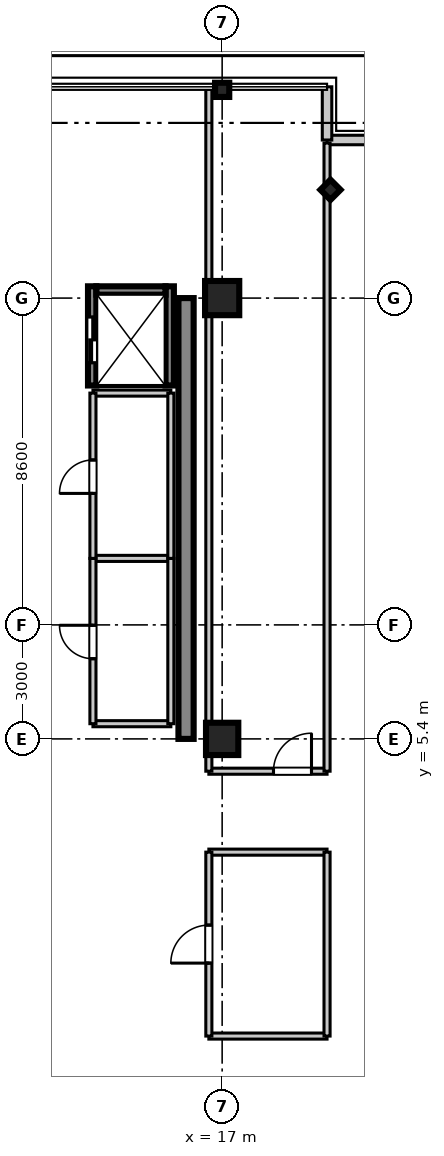
"""IFC4 building model, lengths in metres.
Left out: names, types, materials, properties, quantities, classifications, styles, units other than length and angle.
Written with IfcOpenShell. Run it as: python <this file> out.ifc"""

import sys

from ifc_helpers import new_model, si_unit, direction, frame, frame_2d, origin, origin_2d, place, context, subcontext, project, spatial, rectangle, i_section, extrude, source, transform, mapped, element, fill, save


model = new_model("IFC4")
c1 = context("Model", 3, precision=1e-05, world=origin(), true_north=direction((0.0, 1.0)))
c2 = subcontext(c1, "Body", "Model", "MODEL_VIEW")
j1 = project(units=[si_unit("LENGTHUNIT", "METRE"), si_unit("PLANEANGLEUNIT", "RADIAN")], contexts=[c1])
p1 = place(None, origin())
s1 = spatial("IfcSite", under=j1, at=p1, CompositionType="ELEMENT")
p2 = place(p1, origin())
s2 = spatial("IfcBuilding", under=s1, at=p2, CompositionType="ELEMENT")
p3 = place(p2, frame((0.0, 0.0, 266.3)))
s3 = spatial("IfcBuildingStorey", under=s2, at=p3, CompositionType="ELEMENT", Elevation=266.3)
m1 = source(origin(), c2, "Body", "SweptSolid", [
    extrude(rectangle(XDim=0.85, YDim=0.85, at=origin_2d()), origin(), (0.0, 0.0, 1.0), 3.705),
])
p4 = place(p3, frame((17.0, 5.4, 0.0), z_axis=(0.0, 0.0, 1.0), x_axis=(1.0, 0.0, 0.0)))
e1 = element("IfcColumn", 1, at=p4, inside=s3, PredefinedType="PILASTER", context=c2, shape_type="MappedRepresentation", body=[
    mapped(m1, transform((0.0, 0.0, 0.0), scale=1.0)),
])
m2 = source(origin(), c2, "Body", "SweptSolid", [
    extrude(rectangle(XDim=0.9, YDim=0.9, at=origin_2d()), origin(), (0.0, 0.0, 1.0), 3.705),
])
p5 = place(p3, frame((17.0, 17.0, 0.0), z_axis=(0.0, 0.0, 1.0), x_axis=(1.0, 0.0, 0.0)))
e2 = element("IfcColumn", 2, at=p5, inside=s3, PredefinedType="COLUMN", context=c2, shape_type="MappedRepresentation", body=[
    mapped(m2, transform((0.0, 0.0, 0.0), scale=1.0)),
])
m3 = source(origin(), c2, "Body", "SweptSolid", [
    extrude(i_section(OverallWidth=0.374, OverallDepth=0.374, WebThickness=0.014, FlangeThickness=0.023, at=origin_2d()), origin(), (0.0, 0.0, 1.0), 3.705),
])
for number, where, z_axis, x_axis in (
    (3, (17.0, 22.48, 0.0), (0.0, 0.0, 1.0), (0.0, 1.0, 0.0)),
    (4, (19.85, 19.85, 0.0), (0.0, 0.0, 1.0), (0.707, 0.707, 0.0)),
):
    element("IfcColumn", number, at=place(p3, frame(where, z_axis=z_axis, x_axis=x_axis)), inside=s3, PredefinedType="COLUMN", context=c2, shape_type="MappedRepresentation", body=[
        mapped(m3, transform((0.0, 0.0, 0.0), scale=1.0)),
    ])
m4 = source(origin(), c2, "Body", "SweptSolid", [
    extrude(rectangle(XDim=11.6, YDim=0.4, at=frame_2d((5.8, 0.0))), origin(), (0.0, 0.0, 1.0), 3.45),
])
p6 = place(p3, frame((16.05, 5.4, 0.0), z_axis=(0.0, 0.0, 1.0), x_axis=(0.0, 1.0, 0.0)))
e5 = element("IfcWall", 5, at=p6, inside=s3, PredefinedType="SHEAR", context=c2, shape_type="MappedRepresentation", body=[
    mapped(m4, transform((0.0, 0.0, 0.0), scale=1.0)),
])
m5 = source(origin(), c2, "Body", "SweptSolid", [
    extrude(rectangle(XDim=2.61, YDim=0.22, at=frame_2d((1.305, 0.0))), origin(), (0.0, 0.0, 1.0), 3.45),
])
p7 = place(p3, frame((13.58, 14.7, 0.0), z_axis=(0.0, 0.0, 1.0), x_axis=(0.0, 1.0, 0.0)))
e6 = element("IfcWall", 6, at=p7, inside=s3, PredefinedType="SHEAR", context=c2, shape_type="MappedRepresentation", body=[
    mapped(m5, transform((0.0, 0.0, 0.0), scale=1.0)),
])
p8 = place(p7, frame((0.6, 0.0, 0.0)))
e7 = element("IfcOpeningElement", 7, at=p8, cuts=e6, PredefinedType="OPENING", context=c2, shape_type="SweptSolid", body=[
    extrude(rectangle(XDim=1.2, YDim=2.2, at=frame_2d((0.6, 1.1))), frame((0.0, 0.12, 0.0), z_axis=(0.0, -1.0, 0.0), x_axis=(1.0, 0.0, 0.0)), (0.0, 0.0, 1.0), 0.24),
])
p9 = place(p3, frame((15.62, 14.7, 0.0), z_axis=(0.0, 0.0, 1.0), x_axis=(0.0, 1.0, 0.0)))
e8 = element("IfcWall", 8, at=p9, inside=s3, PredefinedType="SHEAR", context=c2, shape_type="MappedRepresentation", body=[
    mapped(m5, transform((0.0, 0.0, 0.0), scale=1.0)),
])
m6 = source(origin(), c2, "Body", "SweptSolid", [
    extrude(rectangle(XDim=1.82, YDim=0.22, at=frame_2d((0.91, 0.0))), origin(), (0.0, 0.0, 1.0), 3.45),
])
p10 = place(p3, frame((13.69, 17.2, 0.0), z_axis=(0.0, 0.0, 1.0), x_axis=(1.0, 0.0, 0.0)))
e9 = element("IfcWall", 9, at=p10, inside=s3, PredefinedType="SHEAR", context=c2, shape_type="MappedRepresentation", body=[
    mapped(m6, transform((0.0, 0.0, 0.0), scale=1.0)),
])
m7 = source(origin(), c2, "Body", "SweptSolid", [
    extrude(rectangle(XDim=1.4, YDim=0.25, at=frame_2d((0.7, 0.0))), origin(), (0.0, 0.0, 1.0), 3.45),
])
p11 = place(p3, frame((19.76, 21.16, 0.0), z_axis=(0.0, 0.0, 1.0), x_axis=(1.0, 0.0, 0.0)))
e10 = element("IfcWall", 10, at=p11, inside=s3, PredefinedType="STANDARD", context=c2, shape_type="MappedRepresentation", body=[
    mapped(m7, transform((0.0, 0.0, 0.0), scale=1.0)),
])
m8 = source(origin(), c2, "Body", "SweptSolid", [
    extrude(rectangle(XDim=1.4, YDim=0.25, at=frame_2d((0.7, 0.0))), origin(), (0.0, 0.0, 1.0), 3.45),
])
p12 = place(p3, frame((19.76, 21.16, 0.0), z_axis=(0.0, 0.0, 1.0), x_axis=(0.0, 1.0, 0.0)))
e11 = element("IfcWall", 11, at=p12, inside=s3, PredefinedType="STANDARD", context=c2, shape_type="MappedRepresentation", body=[
    mapped(m8, transform((0.0, 0.0, 0.0), scale=1.0)),
])
m9 = source(origin(), c2, "Body", "SweptSolid", [
    extrude(rectangle(XDim=2.05, YDim=0.16, at=frame_2d((1.025, 0.0))), origin(), (0.0, 0.0, 1.0), 2.79),
])
for number, where, z_axis, x_axis in (
    (12, (13.6, 5.8, 0.0), (0.0, 0.0, 1.0), (1.0, 0.0, 0.0)),
    (13, (13.6, 10.15, 0.0), (0.0, 0.0, 1.0), (1.0, 0.0, 0.0)),
):
    element("IfcWall", number, at=place(p3, frame(where, z_axis=z_axis, x_axis=x_axis)), inside=s3, PredefinedType="PARTITIONING", context=c2, shape_type="MappedRepresentation", body=[
        mapped(m9, transform((0.0, 0.0, 0.0), scale=1.0)),
    ])
m10 = source(origin(), c2, "Body", "SweptSolid", [
    extrude(rectangle(XDim=4.35, YDim=0.16, at=frame_2d((2.175, 0.0))), origin(), (0.0, 0.0, 1.0), 2.79),
])
p13 = place(p3, frame((13.6, 5.8, 0.0), z_axis=(0.0, 0.0, 1.0), x_axis=(0.0, 1.0, 0.0)))
e14 = element("IfcWall", 14, at=p13, inside=s3, PredefinedType="PARTITIONING", context=c2, shape_type="MappedRepresentation", body=[
    mapped(m10, transform((0.0, 0.0, 0.0), scale=1.0)),
])
p14 = place(p13, frame((1.71, 0.0, 0.0)))
e15 = element("IfcOpeningElement", 15, at=p14, cuts=e14, PredefinedType="OPENING", context=c2, shape_type="SweptSolid", body=[
    extrude(rectangle(XDim=0.88, YDim=2.1, at=frame_2d((0.44, 1.05))), frame((0.0, 0.09, 0.0), z_axis=(0.0, -1.0, 0.0), x_axis=(1.0, 0.0, 0.0)), (0.0, 0.0, 1.0), 0.18),
])
p15 = place(p3, frame((15.65, 5.8, 0.0), z_axis=(0.0, 0.0, 1.0), x_axis=(0.0, 1.0, 0.0)))
e16 = element("IfcWall", 16, at=p15, inside=s3, PredefinedType="PARTITIONING", context=c2, shape_type="MappedRepresentation", body=[
    mapped(m10, transform((0.0, 0.0, 0.0), scale=1.0)),
])
p16 = place(p3, frame((13.6, 14.5, 0.0), z_axis=(0.0, 0.0, 1.0), x_axis=(1.0, 0.0, 0.0)))
e17 = element("IfcWall", 17, at=p16, inside=s3, PredefinedType="PARTITIONING", context=c2, shape_type="MappedRepresentation", body=[
    mapped(m9, transform((0.0, 0.0, 0.0), scale=1.0)),
])
m11 = source(origin(), c2, "Body", "SweptSolid", [
    extrude(rectangle(XDim=4.35, YDim=0.16, at=frame_2d((2.175, 0.0))), origin(), (0.0, 0.0, 1.0), 2.79),
])
p17 = place(p3, frame((13.6, 10.15, 0.0), z_axis=(0.0, 0.0, 1.0), x_axis=(0.0, 1.0, 0.0)))
e18 = element("IfcWall", 18, at=p17, inside=s3, PredefinedType="PARTITIONING", context=c2, shape_type="MappedRepresentation", body=[
    mapped(m11, transform((0.0, 0.0, 0.0), scale=1.0)),
])
p18 = place(p17, frame((1.71, 0.0, 0.0)))
e19 = element("IfcOpeningElement", 19, at=p18, cuts=e18, PredefinedType="OPENING", context=c2, shape_type="SweptSolid", body=[
    extrude(rectangle(XDim=0.88, YDim=2.1, at=frame_2d((0.44, 1.05))), frame((0.0, 0.09, 0.0), z_axis=(0.0, -1.0, 0.0), x_axis=(1.0, 0.0, 0.0)), (0.0, 0.0, 1.0), 0.18),
])
p19 = place(p3, frame((15.65, 10.15, 0.0), z_axis=(0.0, 0.0, 1.0), x_axis=(0.0, 1.0, 0.0)))
e20 = element("IfcWall", 20, at=p19, inside=s3, PredefinedType="PARTITIONING", context=c2, shape_type="MappedRepresentation", body=[
    mapped(m11, transform((0.0, 0.0, 0.0), scale=1.0)),
])
m12 = source(origin(), c2, "Body", "SweptSolid", [
    extrude(rectangle(XDim=3.11, YDim=0.16, at=frame_2d((1.555, 0.0))), origin(), (0.0, 0.0, 1.0), 2.79),
])
p20 = place(p3, frame((16.65, 4.55, 0.0), z_axis=(0.0, 0.0, 1.0), x_axis=(1.0, 0.0, 0.0)))
e21 = element("IfcWall", 21, at=p20, inside=s3, PredefinedType="PARTITIONING", context=c2, shape_type="MappedRepresentation", body=[
    mapped(m12, transform((0.0, 0.0, 0.0), scale=1.0)),
])
p21 = place(p20, frame((1.701, 0.0, 0.0)))
e22 = element("IfcOpeningElement", 22, at=p21, cuts=e21, PredefinedType="OPENING", context=c2, shape_type="SweptSolid", body=[
    extrude(rectangle(XDim=1.0, YDim=2.1, at=frame_2d((0.5, 1.05))), frame((0.0, 0.09, 0.0), z_axis=(0.0, -1.0, 0.0), x_axis=(1.0, 0.0, 0.0)), (0.0, 0.0, 1.0), 0.18),
])
m13 = source(origin(), c2, "Body", "SweptSolid", [
    extrude(rectangle(XDim=17.95, YDim=0.16, at=frame_2d((8.975, 0.0))), origin(), (0.0, 0.0, 1.0), 2.79),
])
p22 = place(p3, frame((16.65, 4.55, 0.0), z_axis=(0.0, 0.0, 1.0), x_axis=(0.0, 1.0, 0.0)))
e23 = element("IfcWall", 23, at=p22, inside=s3, PredefinedType="PARTITIONING", context=c2, shape_type="MappedRepresentation", body=[
    mapped(m13, transform((0.0, 0.0, 0.0), scale=1.0)),
])
m14 = source(origin(), c2, "Body", "SweptSolid", [
    extrude(rectangle(XDim=16.53, YDim=0.16, at=frame_2d((8.265, 0.0))), origin(), (0.0, 0.0, 1.0), 2.79),
])
p23 = place(p3, frame((19.76, 4.55, 0.0), z_axis=(0.0, 0.0, 1.0), x_axis=(0.0, 1.0, 0.0)))
e24 = element("IfcWall", 24, at=p23, inside=s3, PredefinedType="PARTITIONING", context=c2, shape_type="MappedRepresentation", body=[
    mapped(m14, transform((0.0, 0.0, 0.0), scale=1.0)),
])
for number, where, z_axis, x_axis in (
    (25, (16.65, -2.42, 0.0), (0.0, 0.0, 1.0), (1.0, 0.0, 0.0)),
    (26, (16.65, 2.42, 0.0), (0.0, 0.0, 1.0), (1.0, 0.0, 0.0)),
):
    element("IfcWall", number, at=place(p3, frame(where, z_axis=z_axis, x_axis=x_axis)), inside=s3, PredefinedType="PARTITIONING", context=c2, shape_type="MappedRepresentation", body=[
        mapped(m12, transform((0.0, 0.0, 0.0), scale=1.0)),
    ])
m15 = source(origin(), c2, "Body", "SweptSolid", [
    extrude(rectangle(XDim=4.84, YDim=0.16, at=frame_2d((2.42, 0.0))), origin(), (0.0, 0.0, 1.0), 2.79),
])
p24 = place(p3, frame((16.65, -2.42, 0.0), z_axis=(0.0, 0.0, 1.0), x_axis=(0.0, 1.0, 0.0)))
e27 = element("IfcWall", 27, at=p24, inside=s3, PredefinedType="PARTITIONING", context=c2, shape_type="MappedRepresentation", body=[
    mapped(m15, transform((0.0, 0.0, 0.0), scale=1.0)),
])
p25 = place(p24, frame((1.92, 0.0, 0.0)))
e28 = element("IfcOpeningElement", 28, at=p25, cuts=e27, PredefinedType="OPENING", context=c2, shape_type="SweptSolid", body=[
    extrude(rectangle(XDim=1.0, YDim=2.1, at=frame_2d((0.5, 1.05))), frame((0.0, 0.09, 0.0), z_axis=(0.0, -1.0, 0.0), x_axis=(1.0, 0.0, 0.0)), (0.0, 0.0, 1.0), 0.18),
])
p26 = place(p3, frame((19.76, -2.42, 0.0), z_axis=(0.0, 0.0, 1.0), x_axis=(0.0, 1.0, 0.0)))
e29 = element("IfcWall", 29, at=p26, inside=s3, PredefinedType="PARTITIONING", context=c2, shape_type="MappedRepresentation", body=[
    mapped(m15, transform((0.0, 0.0, 0.0), scale=1.0)),
])
m16 = source(origin(), c2, "Body", "SweptSolid", [
    extrude(rectangle(XDim=1.2, YDim=2.2, at=frame_2d((0.6, 1.1))), frame((0.0, 0.025, 0.0), z_axis=(0.0, -1.0, 0.0), x_axis=(1.0, 0.0, 0.0)), (0.0, 0.0, 1.0), 0.05),
])
p27 = place(p8, origin())
e30 = element("IfcDoor", 30, at=p27, inside=s3, OperationType="DOUBLE_DOOR_SLIDING", PredefinedType="DOOR", context=c2, shape_type="MappedRepresentation", body=[
    mapped(m16, transform((0.0, 0.0, 0.0), scale=1.0)),
])
fill(e7, e30)
m17 = source(origin(), c2, "Body", "SweptSolid", [
    extrude(rectangle(XDim=0.88, YDim=2.1, at=frame_2d((0.44, 1.05))), frame((0.0, 0.025, 0.0), z_axis=(0.0, -1.0, 0.0), x_axis=(1.0, 0.0, 0.0)), (0.0, 0.0, 1.0), 0.05),
])
p28 = place(p14, frame((0.88, 0.0, 0.0), z_axis=(0.0, 0.0, 1.0), x_axis=(-1.0, 0.0, 0.0)))
e31 = element("IfcDoor", 31, at=p28, inside=s3, OperationType="SINGLE_SWING_RIGHT", PredefinedType="DOOR", context=c2, shape_type="MappedRepresentation", body=[
    mapped(m17, transform((0.0, 0.0, 0.0), scale=1.0)),
])
fill(e15, e31)
p29 = place(p18, frame((0.88, 0.0, 0.0), z_axis=(0.0, 0.0, 1.0), x_axis=(-1.0, 0.0, 0.0)))
e32 = element("IfcDoor", 32, at=p29, inside=s3, OperationType="SINGLE_SWING_LEFT", PredefinedType="DOOR", context=c2, shape_type="MappedRepresentation", body=[
    mapped(m17, transform((0.0, 0.0, 0.0), scale=1.0)),
])
fill(e19, e32)
m18 = source(origin(), c2, "Body", "SweptSolid", [
    extrude(rectangle(XDim=1.0, YDim=2.1, at=frame_2d((0.5, 1.05))), frame((0.0, 0.025, 0.0), z_axis=(0.0, -1.0, 0.0), x_axis=(1.0, 0.0, 0.0)), (0.0, 0.0, 1.0), 0.05),
])
p30 = place(p21, origin())
e33 = element("IfcDoor", 33, at=p30, inside=s3, OperationType="SINGLE_SWING_RIGHT", PredefinedType="DOOR", context=c2, shape_type="MappedRepresentation", body=[
    mapped(m18, transform((0.0, 0.0, 0.0), scale=1.0)),
])
fill(e22, e33)
p31 = place(p25, frame((1.0, 0.0, 0.0), z_axis=(0.0, 0.0, 1.0), x_axis=(-1.0, 0.0, 0.0)))
e34 = element("IfcDoor", 34, at=p31, inside=s3, OperationType="SINGLE_SWING_LEFT", PredefinedType="DOOR", context=c2, shape_type="MappedRepresentation", body=[
    mapped(m18, transform((0.0, 0.0, 0.0), scale=1.0)),
])
fill(e28, e34)
save(model, sys.argv[1])
